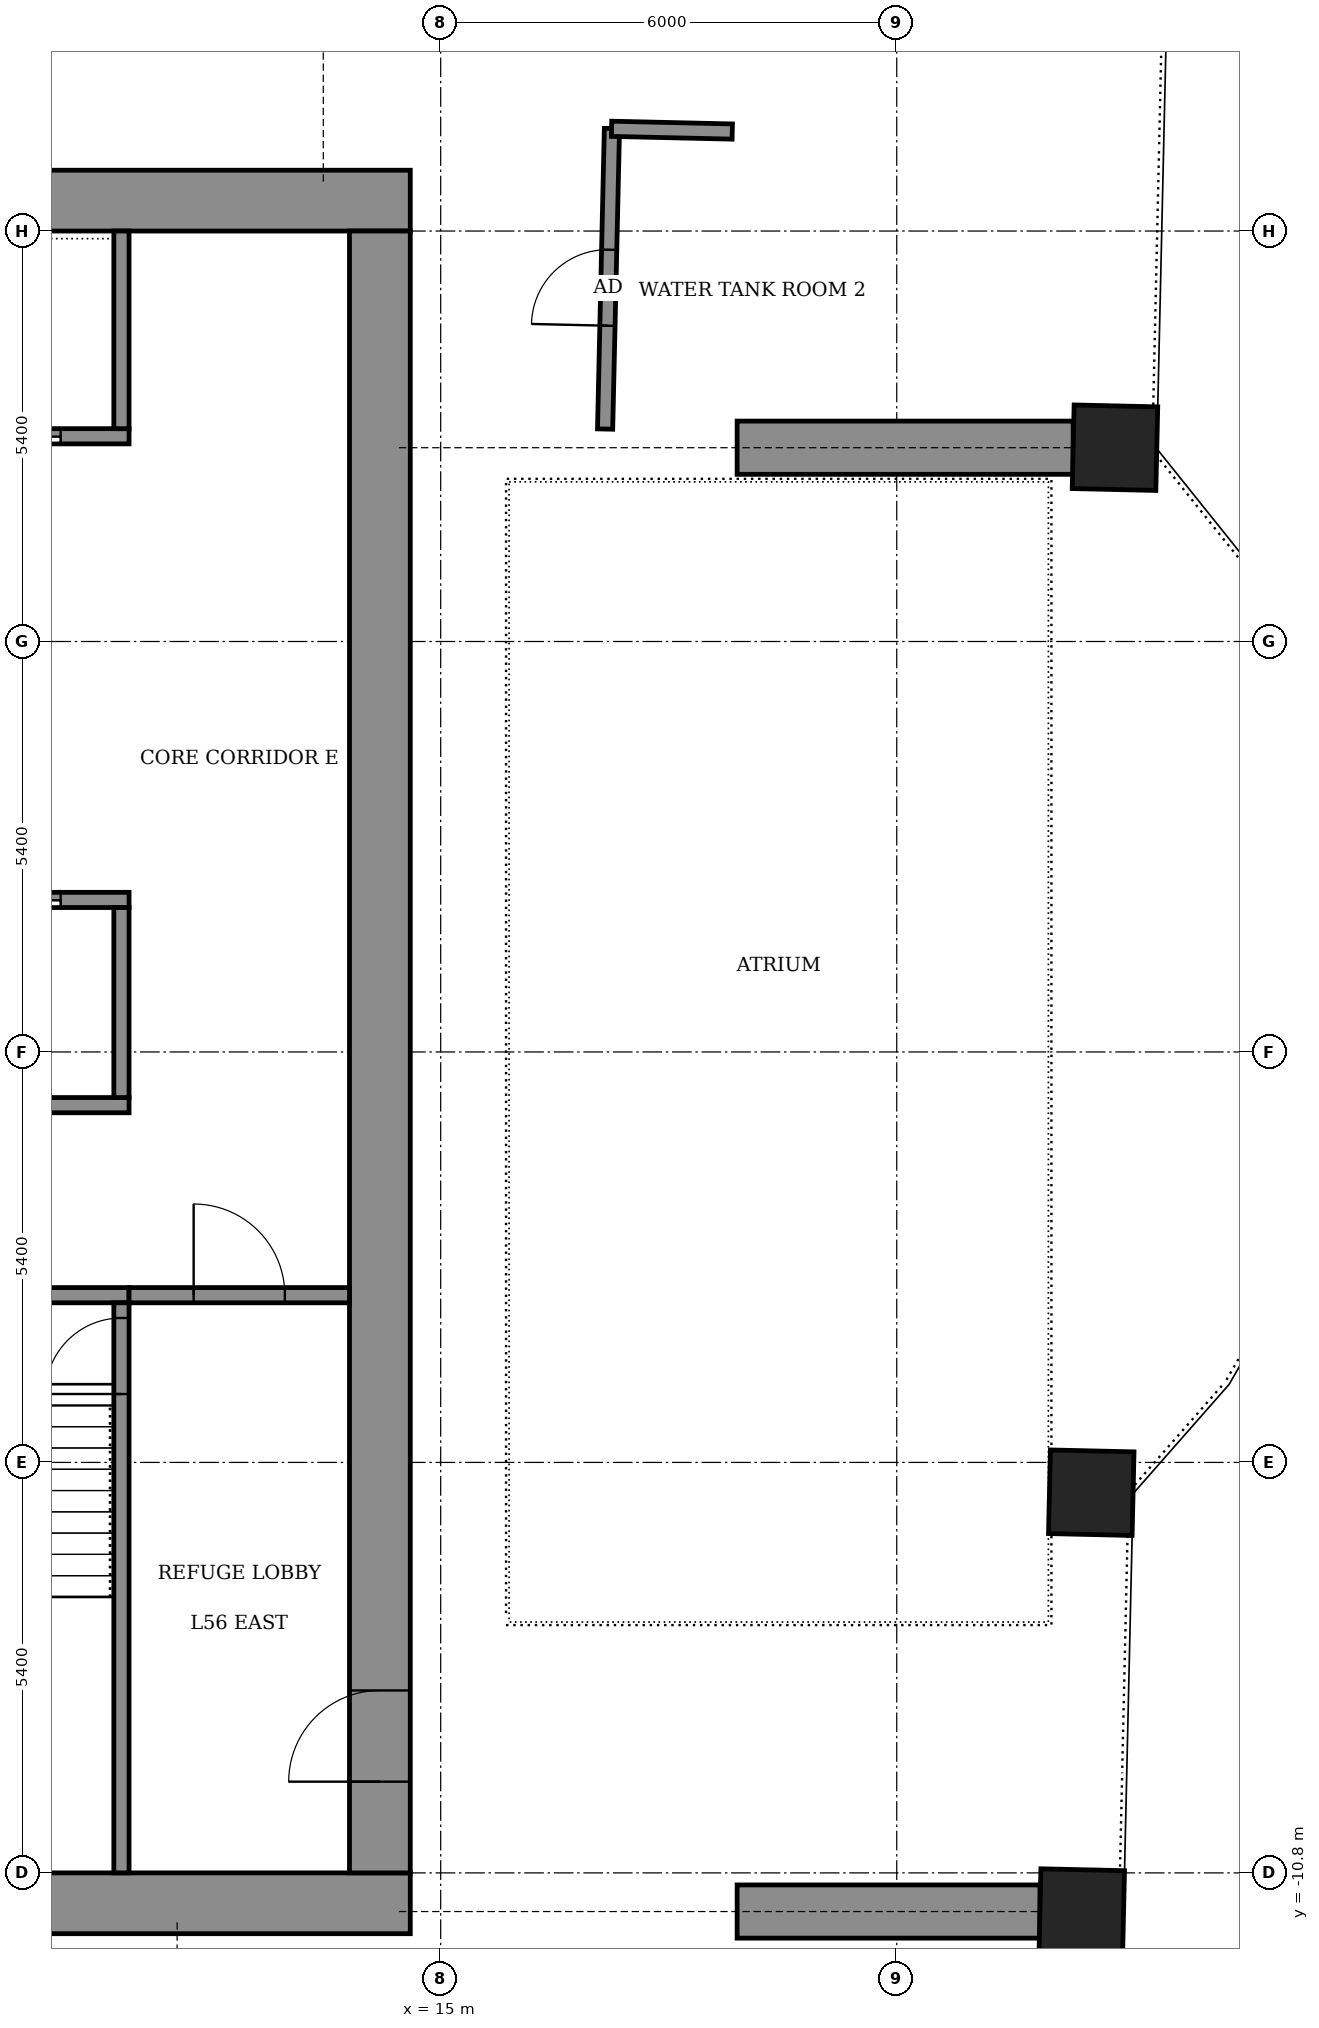
"""IFC4 building model, lengths in metres.
Left out: names, types, materials, properties, quantities, classifications, styles, units other than length and angle.
Written with IfcOpenShell. Run it as: python <this file> out.ifc"""

import sys

from ifc_helpers import new_model, si_unit, direction, frame, frame_2d, origin, origin_2d, place, context, subcontext, project, spatial, rectangle, extrude, element, fill, save


model = new_model("IFC4")
c1 = context("Model", 3, precision=1e-05, world=origin(), true_north=direction((0.0, 1.0)))
c2 = subcontext(c1, "Body", "Model", "MODEL_VIEW")
j1 = project(units=[si_unit("LENGTHUNIT", "METRE"), si_unit("PLANEANGLEUNIT", "RADIAN")], contexts=[c1])
p1 = place(None, origin())
s1 = spatial("IfcSite", under=j1, at=p1, CompositionType="ELEMENT")
p2 = place(p1, origin())
s2 = spatial("IfcBuilding", under=s1, at=p2, CompositionType="ELEMENT")
p3 = place(p2, frame((0.0, 0.0, 219.5)))
s3 = spatial("IfcBuildingStorey", under=s2, at=p3, CompositionType="ELEMENT", Elevation=219.5)
for number, where, z_axis, x_axis in (
    (1, (23.434, -11.309, -0.55), (0.0, 0.0, 1.0), (0.023, 1.0, 0.0)),
    (2, (23.559, -5.799, -0.55), (0.0, 0.0, 1.0), (0.023, 1.0, 0.0)),
    (3, (23.871, 7.949, -0.55), (0.0, 0.0, 1.0), (0.023, 1.0, 0.0)),
):
    element("IfcColumn", number, at=place(p3, frame(where, z_axis=z_axis, x_axis=x_axis)), inside=s3, PredefinedType="COLUMN", context=c2, shape_type="SweptSolid", body=[
        extrude(rectangle(XDim=1.1, YDim=1.1, at=origin_2d()), origin(), (0.0, 0.0, 1.0), 7.0),
    ])
p4 = place(p3, frame((18.9, 7.949, 0.0), z_axis=(0.0, 0.0, 1.0), x_axis=(1.0, 0.0, 0.0)))
e4 = element("IfcWall", 4, at=p4, inside=s3, PredefinedType="SHEAR", context=c2, shape_type="SweptSolid", body=[
    extrude(rectangle(XDim=4.421, YDim=0.7, at=frame_2d((2.21, 0.0))), origin(), (0.0, 0.0, 1.0), 3.0),
])
p5 = place(p3, frame((18.9, -11.309, 0.0), z_axis=(0.0, 0.0, 1.0), x_axis=(1.0, 0.0, 0.0)))
e5 = element("IfcWall", 5, at=p5, inside=s3, PredefinedType="SHEAR", context=c2, shape_type="SweptSolid", body=[
    extrude(rectangle(XDim=3.984, YDim=0.7, at=frame_2d((1.992, 0.0))), origin(), (0.0, 0.0, 1.0), 3.0),
])
p6 = place(p3, frame((17.163, 8.195, 0.0), z_axis=(0.0, 0.0, 1.0), x_axis=(0.022717198559, 0.999741931145, 0.0)))
e6 = element("IfcWall", 6, at=p6, inside=s3, PredefinedType="PARTITIONING", context=c2, shape_type="SweptSolid", body=[
    extrude(rectangle(XDim=3.955, YDim=0.2, at=frame_2d((1.978, 0.0))), origin(), (0.0, 0.0, 1.0), 3.0),
])
p7 = place(p6, frame((1.36, 0.0, 0.0)))
e7 = element("IfcOpeningElement", 7, at=p7, cuts=e6, PredefinedType="OPENING", context=c2, shape_type="SweptSolid", body=[
    extrude(rectangle(XDim=1.0, YDim=2.1, at=frame_2d((0.5, 1.05))), frame((0.0, 0.11, 0.0), z_axis=(0.0, -1.0, 0.0), x_axis=(1.0, 0.0, 0.0)), (0.0, 0.0, 1.0), 0.22),
])
p8 = place(p3, frame((17.248, 12.145, 0.0), z_axis=(0.0, 0.0, 1.0), x_axis=(0.99974120031, -0.022749338506, 0.0)))
e8 = element("IfcWall", 8, at=p8, inside=s3, PredefinedType="PARTITIONING", context=c2, shape_type="SweptSolid", body=[
    extrude(rectangle(XDim=1.588, YDim=0.2, at=frame_2d((0.794, 0.0))), origin(), (0.0, 0.0, 1.0), 6.45),
])
for number, where, z_axis, x_axis in (
    (9, (-14.6, -11.2, 0.0), (0.0, 0.0, 1.0), (1.0, 0.0, 0.0)),
    (10, (-14.6, 11.2, 0.0), (0.0, 0.0, 1.0), (1.0, 0.0, 0.0)),
):
    element("IfcWall", number, at=place(p3, frame(where, z_axis=z_axis, x_axis=x_axis)), inside=s3, PredefinedType="SHEAR", context=c2, shape_type="SweptSolid", body=[
        extrude(rectangle(XDim=29.2, YDim=0.8, at=frame_2d((14.6, 0.0))), origin(), (0.0, 0.0, 1.0), 7.0),
    ])
p9 = place(p3, frame((14.2, -10.8, 0.0), z_axis=(0.0, 0.0, 1.0), x_axis=(0.0, 1.0, 0.0)))
e11 = element("IfcWall", 11, at=p9, inside=s3, PredefinedType="SHEAR", context=c2, shape_type="SweptSolid", body=[
    extrude(rectangle(XDim=21.6, YDim=0.8, at=frame_2d((10.8, 0.0))), origin(), (0.0, 0.0, 1.0), 7.0),
])
p10 = place(p9, frame((1.2, 0.0, 0.0)))
e12 = element("IfcOpeningElement", 12, at=p10, cuts=e11, PredefinedType="OPENING", context=c2, shape_type="SweptSolid", body=[
    extrude(rectangle(XDim=1.2, YDim=2.1, at=frame_2d((0.6, 1.05))), frame((0.0, 0.41, 0.0), z_axis=(0.0, -1.0, 0.0), x_axis=(1.0, 0.0, 0.0)), (0.0, 0.0, 1.0), 0.82),
])
p11 = place(p3, frame((-10.9, -3.2, 0.0), z_axis=(0.0, 0.0, 1.0), x_axis=(1.0, 0.0, 0.0)))
e13 = element("IfcWall", 13, at=p11, inside=s3, PredefinedType="SHEAR", context=c2, shape_type="SweptSolid", body=[
    extrude(rectangle(XDim=21.8, YDim=0.2, at=frame_2d((10.9, 0.0))), origin(), (0.0, 0.0, 1.0), 6.45),
])
p12 = place(p11, frame((1.075, 0.0, 0.0)))
e14 = element("IfcOpeningElement", 14, at=p12, cuts=e13, PredefinedType="OPENING", context=c2, shape_type="SweptSolid", body=[
    extrude(rectangle(XDim=1.1, YDim=2.1, at=frame_2d((0.55, 1.05))), frame((0.0, 0.11, 0.0), z_axis=(0.0, -1.0, 0.0), x_axis=(1.0, 0.0, 0.0)), (0.0, 0.0, 1.0), 0.22),
])
p13 = place(p11, frame((10.325, 0.0, 0.0)))
e15 = element("IfcOpeningElement", 15, at=p13, cuts=e13, PredefinedType="OPENING", context=c2, shape_type="SweptSolid", body=[
    extrude(rectangle(XDim=1.1, YDim=2.1, at=frame_2d((0.55, 1.05))), frame((0.0, 0.11, 0.0), z_axis=(0.0, -1.0, 0.0), x_axis=(1.0, 0.0, 0.0)), (0.0, 0.0, 1.0), 0.22),
])
p14 = place(p11, frame((19.625, 0.0, 0.0)))
e16 = element("IfcOpeningElement", 16, at=p14, cuts=e13, PredefinedType="OPENING", context=c2, shape_type="SweptSolid", body=[
    extrude(rectangle(XDim=1.1, YDim=2.1, at=frame_2d((0.55, 1.05))), frame((0.0, 0.11, 0.0), z_axis=(0.0, -1.0, 0.0), x_axis=(1.0, 0.0, 0.0)), (0.0, 0.0, 1.0), 0.22),
])
p15 = place(p11, frame((5.7, 0.0, 0.0)))
e17 = element("IfcOpeningElement", 17, at=p15, cuts=e13, PredefinedType="OPENING", context=c2, shape_type="SweptSolid", body=[
    extrude(rectangle(XDim=1.1, YDim=2.1, at=frame_2d((0.55, 1.05))), frame((0.0, 0.11, 0.0), z_axis=(0.0, -1.0, 0.0), x_axis=(1.0, 0.0, 0.0)), (0.0, 0.0, 1.0), 0.22),
])
p16 = place(p11, frame((14.975, 0.0, 0.0)))
e18 = element("IfcOpeningElement", 18, at=p16, cuts=e13, PredefinedType="OPENING", context=c2, shape_type="SweptSolid", body=[
    extrude(rectangle(XDim=1.1, YDim=2.1, at=frame_2d((0.55, 1.05))), frame((0.0, 0.11, 0.0), z_axis=(0.0, -1.0, 0.0), x_axis=(1.0, 0.0, 0.0)), (0.0, 0.0, 1.0), 0.22),
])
p17 = place(p3, frame((-10.9, -0.7, 0.0), z_axis=(0.0, 0.0, 1.0), x_axis=(1.0, 0.0, 0.0)))
e19 = element("IfcWall", 19, at=p17, inside=s3, PredefinedType="SHEAR", context=c2, shape_type="SweptSolid", body=[
    extrude(rectangle(XDim=21.8, YDim=0.2, at=frame_2d((10.9, 0.0))), origin(), (0.0, 0.0, 1.0), 6.45),
])
p18 = place(p3, frame((-10.9, 2.0, 0.0), z_axis=(0.0, 0.0, 1.0), x_axis=(1.0, 0.0, 0.0)))
e20 = element("IfcWall", 20, at=p18, inside=s3, PredefinedType="SHEAR", context=c2, shape_type="SweptSolid", body=[
    extrude(rectangle(XDim=21.8, YDim=0.2, at=frame_2d((10.9, 0.0))), origin(), (0.0, 0.0, 1.0), 6.45),
])
p19 = place(p18, frame((4.95, 0.0, 0.0)))
e21 = element("IfcOpeningElement", 21, at=p19, cuts=e20, PredefinedType="OPENING", context=c2, shape_type="SweptSolid", body=[
    extrude(rectangle(XDim=1.1, YDim=2.1, at=frame_2d((0.55, 1.05))), frame((0.0, 0.11, 0.0), z_axis=(0.0, -1.0, 0.0), x_axis=(1.0, 0.0, 0.0)), (0.0, 0.0, 1.0), 0.22),
])
p20 = place(p18, frame((7.65, 0.0, 0.0)))
e22 = element("IfcOpeningElement", 22, at=p20, cuts=e20, PredefinedType="OPENING", context=c2, shape_type="SweptSolid", body=[
    extrude(rectangle(XDim=1.1, YDim=2.1, at=frame_2d((0.55, 1.05))), frame((0.0, 0.11, 0.0), z_axis=(0.0, -1.0, 0.0), x_axis=(1.0, 0.0, 0.0)), (0.0, 0.0, 1.0), 0.22),
])
p21 = place(p18, frame((10.35, 0.0, 0.0)))
e23 = element("IfcOpeningElement", 23, at=p21, cuts=e20, PredefinedType="OPENING", context=c2, shape_type="SweptSolid", body=[
    extrude(rectangle(XDim=1.1, YDim=2.1, at=frame_2d((0.55, 1.05))), frame((0.0, 0.11, 0.0), z_axis=(0.0, -1.0, 0.0), x_axis=(1.0, 0.0, 0.0)), (0.0, 0.0, 1.0), 0.22),
])
p22 = place(p18, frame((14.4, 0.0, 0.0)))
e24 = element("IfcOpeningElement", 24, at=p22, cuts=e20, PredefinedType="OPENING", context=c2, shape_type="SweptSolid", body=[
    extrude(rectangle(XDim=1.1, YDim=2.1, at=frame_2d((0.55, 1.05))), frame((0.0, 0.11, 0.0), z_axis=(0.0, -1.0, 0.0), x_axis=(1.0, 0.0, 0.0)), (0.0, 0.0, 1.0), 0.22),
])
p23 = place(p18, frame((17.1, 0.0, 0.0)))
e25 = element("IfcOpeningElement", 25, at=p23, cuts=e20, PredefinedType="OPENING", context=c2, shape_type="SweptSolid", body=[
    extrude(rectangle(XDim=1.1, YDim=2.1, at=frame_2d((0.55, 1.05))), frame((0.0, 0.11, 0.0), z_axis=(0.0, -1.0, 0.0), x_axis=(1.0, 0.0, 0.0)), (0.0, 0.0, 1.0), 0.22),
])
p24 = place(p18, frame((19.8, 0.0, 0.0)))
e26 = element("IfcOpeningElement", 26, at=p24, cuts=e20, PredefinedType="OPENING", context=c2, shape_type="SweptSolid", body=[
    extrude(rectangle(XDim=1.1, YDim=2.1, at=frame_2d((0.55, 1.05))), frame((0.0, 0.11, 0.0), z_axis=(0.0, -1.0, 0.0), x_axis=(1.0, 0.0, 0.0)), (0.0, 0.0, 1.0), 0.22),
])
p25 = place(p18, frame((1.675, 0.0, 0.0)))
e27 = element("IfcOpeningElement", 27, at=p25, cuts=e20, PredefinedType="OPENING", context=c2, shape_type="SweptSolid", body=[
    extrude(rectangle(XDim=0.9, YDim=2.1, at=frame_2d((0.45, 1.05))), frame((0.0, 0.11, 0.0), z_axis=(0.0, -1.0, 0.0), x_axis=(1.0, 0.0, 0.0)), (0.0, 0.0, 1.0), 0.22),
])
p26 = place(p18, frame((12.475, 0.0, 0.0)))
e28 = element("IfcOpeningElement", 28, at=p26, cuts=e20, PredefinedType="OPENING", context=c2, shape_type="SweptSolid", body=[
    extrude(rectangle(XDim=0.9, YDim=2.1, at=frame_2d((0.45, 1.05))), frame((0.0, 0.11, 0.0), z_axis=(0.0, -1.0, 0.0), x_axis=(1.0, 0.0, 0.0)), (0.0, 0.0, 1.0), 0.22),
])
p27 = place(p3, frame((-10.9, 8.1, 0.0), z_axis=(0.0, 0.0, 1.0), x_axis=(1.0, 0.0, 0.0)))
e29 = element("IfcWall", 29, at=p27, inside=s3, PredefinedType="SHEAR", context=c2, shape_type="SweptSolid", body=[
    extrude(rectangle(XDim=21.8, YDim=0.2, at=frame_2d((10.9, 0.0))), origin(), (0.0, 0.0, 1.0), 6.45),
])
p28 = place(p27, frame((4.95, 0.0, 0.0)))
e30 = element("IfcOpeningElement", 30, at=p28, cuts=e29, PredefinedType="OPENING", context=c2, shape_type="SweptSolid", body=[
    extrude(rectangle(XDim=1.1, YDim=2.1, at=frame_2d((0.55, 1.05))), frame((0.0, 0.11, 0.0), z_axis=(0.0, -1.0, 0.0), x_axis=(1.0, 0.0, 0.0)), (0.0, 0.0, 1.0), 0.22),
])
p29 = place(p27, frame((7.65, 0.0, 0.0)))
e31 = element("IfcOpeningElement", 31, at=p29, cuts=e29, PredefinedType="OPENING", context=c2, shape_type="SweptSolid", body=[
    extrude(rectangle(XDim=1.1, YDim=2.1, at=frame_2d((0.55, 1.05))), frame((0.0, 0.11, 0.0), z_axis=(0.0, -1.0, 0.0), x_axis=(1.0, 0.0, 0.0)), (0.0, 0.0, 1.0), 0.22),
])
p30 = place(p27, frame((10.35, 0.0, 0.0)))
e32 = element("IfcOpeningElement", 32, at=p30, cuts=e29, PredefinedType="OPENING", context=c2, shape_type="SweptSolid", body=[
    extrude(rectangle(XDim=1.1, YDim=2.1, at=frame_2d((0.55, 1.05))), frame((0.0, 0.11, 0.0), z_axis=(0.0, -1.0, 0.0), x_axis=(1.0, 0.0, 0.0)), (0.0, 0.0, 1.0), 0.22),
])
p31 = place(p27, frame((14.4, 0.0, 0.0)))
e33 = element("IfcOpeningElement", 33, at=p31, cuts=e29, PredefinedType="OPENING", context=c2, shape_type="SweptSolid", body=[
    extrude(rectangle(XDim=1.1, YDim=2.1, at=frame_2d((0.55, 1.05))), frame((0.0, 0.11, 0.0), z_axis=(0.0, -1.0, 0.0), x_axis=(1.0, 0.0, 0.0)), (0.0, 0.0, 1.0), 0.22),
])
p32 = place(p27, frame((17.1, 0.0, 0.0)))
e34 = element("IfcOpeningElement", 34, at=p32, cuts=e29, PredefinedType="OPENING", context=c2, shape_type="SweptSolid", body=[
    extrude(rectangle(XDim=1.1, YDim=2.1, at=frame_2d((0.55, 1.05))), frame((0.0, 0.11, 0.0), z_axis=(0.0, -1.0, 0.0), x_axis=(1.0, 0.0, 0.0)), (0.0, 0.0, 1.0), 0.22),
])
p33 = place(p27, frame((19.8, 0.0, 0.0)))
e35 = element("IfcOpeningElement", 35, at=p33, cuts=e29, PredefinedType="OPENING", context=c2, shape_type="SweptSolid", body=[
    extrude(rectangle(XDim=1.1, YDim=2.1, at=frame_2d((0.55, 1.05))), frame((0.0, 0.11, 0.0), z_axis=(0.0, -1.0, 0.0), x_axis=(1.0, 0.0, 0.0)), (0.0, 0.0, 1.0), 0.22),
])
p34 = place(p27, frame((1.675, 0.0, 0.0)))
e36 = element("IfcOpeningElement", 36, at=p34, cuts=e29, PredefinedType="OPENING", context=c2, shape_type="SweptSolid", body=[
    extrude(rectangle(XDim=0.9, YDim=2.1, at=frame_2d((0.45, 1.05))), frame((0.0, 0.11, 0.0), z_axis=(0.0, -1.0, 0.0), x_axis=(1.0, 0.0, 0.0)), (0.0, 0.0, 1.0), 0.22),
])
p35 = place(p27, frame((12.475, 0.0, 0.0)))
e37 = element("IfcOpeningElement", 37, at=p35, cuts=e29, PredefinedType="OPENING", context=c2, shape_type="SweptSolid", body=[
    extrude(rectangle(XDim=0.9, YDim=2.1, at=frame_2d((0.45, 1.05))), frame((0.0, 0.11, 0.0), z_axis=(0.0, -1.0, 0.0), x_axis=(1.0, 0.0, 0.0)), (0.0, 0.0, 1.0), 0.22),
])
p36 = place(p3, frame((10.8, -10.8, 0.0), z_axis=(0.0, 0.0, 1.0), x_axis=(0.0, 1.0, 0.0)))
e38 = element("IfcWall", 38, at=p36, inside=s3, PredefinedType="SHEAR", context=c2, shape_type="SweptSolid", body=[
    extrude(rectangle(XDim=7.5, YDim=0.2, at=frame_2d((3.75, 0.0))), origin(), (0.0, 0.0, 1.0), 6.45),
])
p37 = place(p36, frame((6.3, 0.0, 0.0)))
e39 = element("IfcOpeningElement", 39, at=p37, cuts=e38, PredefinedType="OPENING", context=c2, shape_type="SweptSolid", body=[
    extrude(rectangle(XDim=1.0, YDim=2.1, at=frame_2d((0.5, 1.05))), frame((0.0, 0.11, 0.0), z_axis=(0.0, -1.0, 0.0), x_axis=(1.0, 0.0, 0.0)), (0.0, 0.0, 1.0), 0.22),
])
p38 = place(p3, frame((10.8, -0.6, 0.0), z_axis=(0.0, 0.0, 1.0), x_axis=(0.0, 1.0, 0.0)))
e40 = element("IfcWall", 40, at=p38, inside=s3, PredefinedType="SHEAR", context=c2, shape_type="SweptSolid", body=[
    extrude(rectangle(XDim=2.5, YDim=0.2, at=frame_2d((1.25, 0.0))), origin(), (0.0, 0.0, 1.0), 6.45),
])
p39 = place(p3, frame((10.8, 8.2, 0.0), z_axis=(0.0, 0.0, 1.0), x_axis=(0.0, 1.0, 0.0)))
e41 = element("IfcWall", 41, at=p39, inside=s3, PredefinedType="SHEAR", context=c2, shape_type="SweptSolid", body=[
    extrude(rectangle(XDim=2.6, YDim=0.2, at=frame_2d((1.3, 0.0))), origin(), (0.0, 0.0, 1.0), 6.45),
])
p40 = place(p3, frame((10.9, -3.2, 0.0), z_axis=(0.0, 0.0, 1.0), x_axis=(1.0, 0.0, 0.0)))
e42 = element("IfcWall", 42, at=p40, inside=s3, PredefinedType="STANDARD", context=c2, shape_type="SweptSolid", body=[
    extrude(rectangle(XDim=2.9, YDim=0.2, at=frame_2d((1.45, 0.0))), origin(), (0.0, 0.0, 1.0), 6.45),
])
p41 = place(p40, frame((0.85, 0.0, 0.0)))
e43 = element("IfcOpeningElement", 43, at=p41, cuts=e42, PredefinedType="OPENING", context=c2, shape_type="SweptSolid", body=[
    extrude(rectangle(XDim=1.2, YDim=2.1, at=frame_2d((0.6, 1.05))), frame((0.0, 0.11, 0.0), z_axis=(0.0, -1.0, 0.0), x_axis=(1.0, 0.0, 0.0)), (0.0, 0.0, 1.0), 0.22),
])
p42 = place(p7, origin())
e44 = element("IfcDoor", 44, at=p42, inside=s3, OperationType="SINGLE_SWING_RIGHT", PredefinedType="DOOR", context=c2, shape_type="SweptSolid", body=[
    extrude(rectangle(XDim=1.0, YDim=2.1, at=frame_2d((0.5, 1.05))), frame((0.0, 0.025, 0.0), z_axis=(0.0, -1.0, 0.0), x_axis=(1.0, 0.0, 0.0)), (0.0, 0.0, 1.0), 0.05),
])
fill(e7, e44)
p43 = place(p10, origin())
e45 = element("IfcDoor", 45, at=p43, inside=s3, OperationType="DOUBLE_DOOR_SINGLE_SWING", PredefinedType="DOOR", context=c2, shape_type="SweptSolid", body=[
    extrude(rectangle(XDim=1.2, YDim=2.1, at=frame_2d((0.6, 1.05))), frame((0.0, 0.025, 0.0), z_axis=(0.0, -1.0, 0.0), x_axis=(1.0, 0.0, 0.0)), (0.0, 0.0, 1.0), 0.05),
])
fill(e12, e45)
p44 = place(p24, origin())
e46 = element("IfcDoor", 46, at=p44, inside=s3, OperationType="SLIDING_TO_LEFT", PredefinedType="DOOR", context=c2, shape_type="SweptSolid", body=[
    extrude(rectangle(XDim=1.1, YDim=2.1, at=frame_2d((0.55, 1.05))), frame((0.0, 0.025, 0.0), z_axis=(0.0, -1.0, 0.0), x_axis=(1.0, 0.0, 0.0)), (0.0, 0.0, 1.0), 0.05),
])
fill(e26, e46)
p45 = place(p33, origin())
e47 = element("IfcDoor", 47, at=p45, inside=s3, OperationType="SLIDING_TO_LEFT", PredefinedType="DOOR", context=c2, shape_type="SweptSolid", body=[
    extrude(rectangle(XDim=1.1, YDim=2.1, at=frame_2d((0.55, 1.05))), frame((0.0, 0.025, 0.0), z_axis=(0.0, -1.0, 0.0), x_axis=(1.0, 0.0, 0.0)), (0.0, 0.0, 1.0), 0.05),
])
fill(e35, e47)
p46 = place(p41, origin())
e48 = element("IfcDoor", 48, at=p46, inside=s3, OperationType="SINGLE_SWING_LEFT", PredefinedType="DOOR", context=c2, shape_type="SweptSolid", body=[
    extrude(rectangle(XDim=1.2, YDim=2.1, at=frame_2d((0.6, 1.05))), frame((0.0, 0.025, 0.0), z_axis=(0.0, -1.0, 0.0), x_axis=(1.0, 0.0, 0.0)), (0.0, 0.0, 1.0), 0.05),
])
fill(e43, e48)
p47 = place(p37, origin())
e49 = element("IfcDoor", 49, at=p47, inside=s3, OperationType="SINGLE_SWING_RIGHT", PredefinedType="DOOR", context=c2, shape_type="SweptSolid", body=[
    extrude(rectangle(XDim=1.0, YDim=2.1, at=frame_2d((0.5, 1.05))), frame((0.0, 0.025, 0.0), z_axis=(0.0, -1.0, 0.0), x_axis=(1.0, 0.0, 0.0)), (0.0, 0.0, 1.0), 0.05),
])
fill(e39, e49)
save(model, sys.argv[1])
